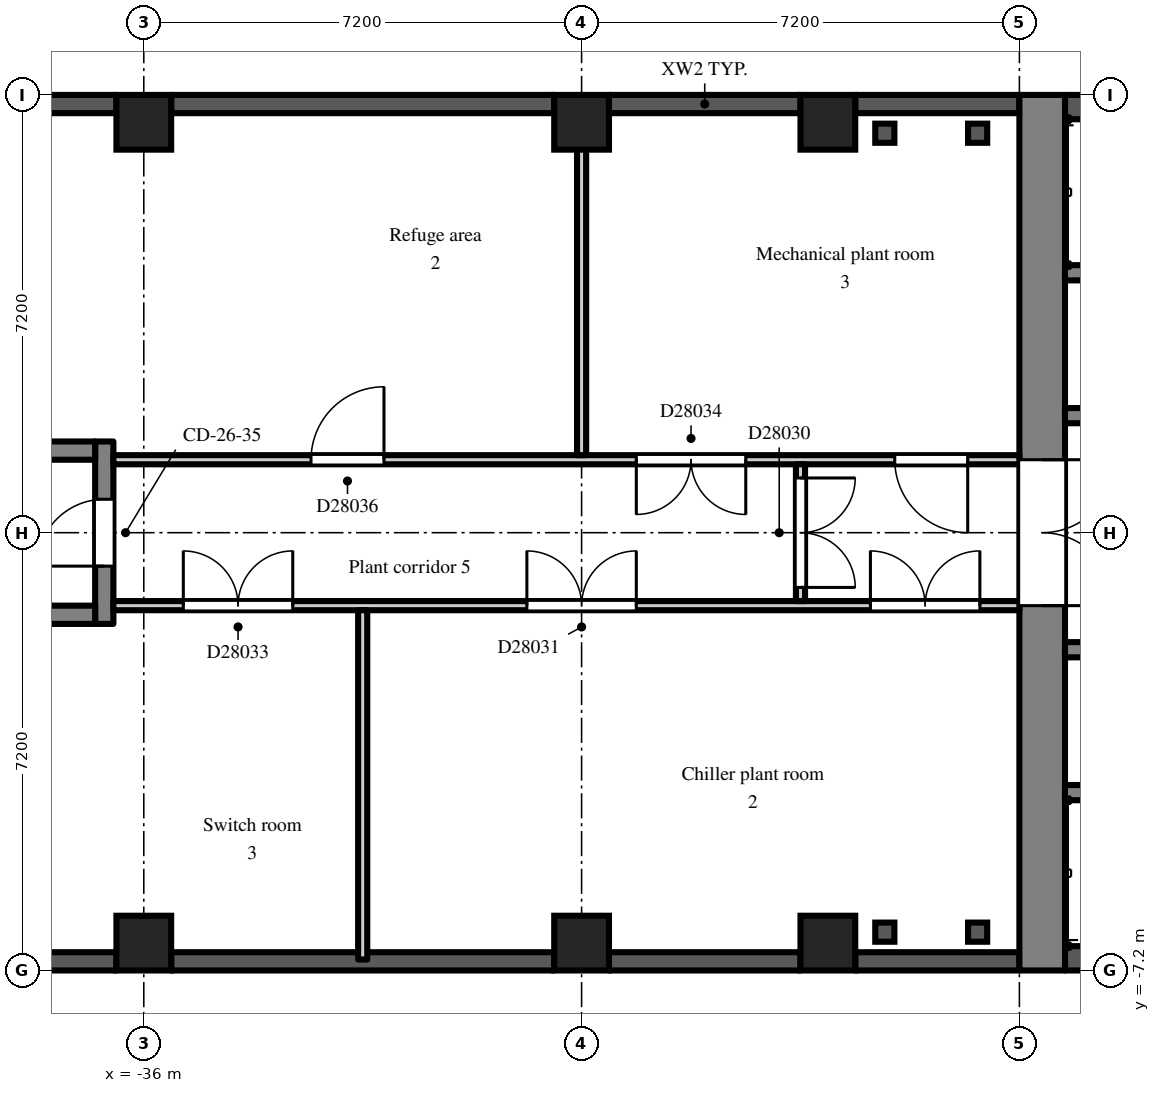
"""IFC4 building model, lengths in metres.
Left out: names, types, materials, properties, quantities, classifications, styles, units other than length and angle.
Written with IfcOpenShell. Run it as: python <this file> out.ifc"""

import sys

from ifc_helpers import new_model, si_unit, direction, frame, frame_2d, origin, origin_2d, place, context, subcontext, project, spatial, polyline, rectangle, outline, extrude, element, fill, save


model = new_model("IFC4")
c1 = context("Model", 3, precision=1e-05, world=origin(), true_north=direction((0.0, 1.0)))
c2 = subcontext(c1, "Body", "Model", "MODEL_VIEW")
j1 = project(units=[si_unit("LENGTHUNIT", "METRE"), si_unit("PLANEANGLEUNIT", "RADIAN")], contexts=[c1])
p1 = place(None, origin())
s1 = spatial("IfcSite", under=j1, at=p1, CompositionType="ELEMENT")
p2 = place(p1, origin())
s2 = spatial("IfcBuilding", under=s1, at=p2, CompositionType="ELEMENT")
p3 = place(p2, frame((0.0, 0.0, 194.7)))
s3 = spatial("IfcBuildingStorey", under=s2, at=p3, CompositionType="ELEMENT", Elevation=194.7)
for number, where, z_axis, x_axis in (
    (1, (-36.0, -6.75, 0.0), (0.0, 0.0, 1.0), (1.0, 0.0, 0.0)),
    (2, (-36.0, 6.75, 0.0), (0.0, 0.0, 1.0), (1.0, 0.0, 0.0)),
    (3, (-28.8, -6.75, 0.0), (0.0, 0.0, 1.0), (1.0, 0.0, 0.0)),
    (4, (-28.8, 6.75, 0.0), (0.0, 0.0, 1.0), (1.0, 0.0, 0.0)),
    (5, (-24.75, -6.75, 0.0), (0.0, 0.0, 1.0), (1.0, 0.0, 0.0)),
    (6, (-24.75, 6.75, 0.0), (0.0, 0.0, 1.0), (1.0, 0.0, 0.0)),
):
    element("IfcColumn", number, at=place(p3, frame(where, z_axis=z_axis, x_axis=x_axis)), inside=s3, PredefinedType="COLUMN", context=c2, shape_type="SweptSolid", body=[
        extrude(rectangle(XDim=0.9, YDim=0.9, at=origin_2d()), origin(), (0.0, 0.0, 1.0), 4.2),
    ])
p4 = place(p3, frame((-21.6, 7.05, 0.0), z_axis=(0.0, 0.0, 1.0), x_axis=(-1.0, 0.0, 0.0)))
e7 = element("IfcWall", 7, at=p4, inside=s3, PredefinedType="SOLIDWALL", context=c2, shape_type="SweptSolid", body=[
    extrude(rectangle(XDim=2.7, YDim=0.3, at=frame_2d((1.35, 0.0))), origin(), (0.0, 0.0, 1.0), 3.5),
])
p5 = place(p3, frame((-25.2, 7.05, 0.0), z_axis=(0.0, 0.0, 1.0), x_axis=(-1.0, 0.0, 0.0)))
e8 = element("IfcWall", 8, at=p5, inside=s3, PredefinedType="SOLIDWALL", context=c2, shape_type="SweptSolid", body=[
    extrude(rectangle(XDim=3.15, YDim=0.3, at=frame_2d((1.575, 0.0))), origin(), (0.0, 0.0, 1.0), 3.8),
])
p6 = place(p3, frame((-29.25, 7.05, 0.0), z_axis=(0.0, 0.0, 1.0), x_axis=(-1.0, 0.0, 0.0)))
e9 = element("IfcWall", 9, at=p6, inside=s3, PredefinedType="SOLIDWALL", context=c2, shape_type="SweptSolid", body=[
    extrude(outline(polyline([(0.0, 0.0), (6.3, 0.0), (6.3, 3.8), (1.952, 3.8), (1.95, 3.4), (1.15, 3.4), (1.148, 3.8), (0.0, 3.8), (0.0, 0.0)])), frame((0.0, 0.15, 0.0), z_axis=(0.0, -1.0, 0.0), x_axis=(1.0, 0.0, 0.0)), (0.0, 0.0, 1.0), 0.3),
])
for number, where, z_axis, x_axis in (
    (10, (-36.45, 7.05, 0.0), (0.0, 0.0, 1.0), (-1.0, 0.0, 0.0)),
    (11, (-38.7, -7.05, 0.0), (0.0, 0.0, 1.0), (1.0, 0.0, 0.0)),
):
    element("IfcWall", number, at=place(p3, frame(where, z_axis=z_axis, x_axis=x_axis)), inside=s3, PredefinedType="SOLIDWALL", context=c2, shape_type="SweptSolid", body=[
        extrude(rectangle(XDim=2.25, YDim=0.3, at=frame_2d((1.125, 0.0))), origin(), (0.0, 0.0, 1.0), 3.8),
    ])
p7 = place(p3, frame((-35.55, -7.05, 0.0), z_axis=(0.0, 0.0, 1.0), x_axis=(1.0, 0.0, 0.0)))
e12 = element("IfcWall", 12, at=p7, inside=s3, PredefinedType="SOLIDWALL", context=c2, shape_type="SweptSolid", body=[
    extrude(outline(polyline([(0.0, 0.0), (6.3, 0.0), (6.3, 3.8), (5.152, 3.8), (5.15, 3.4), (4.35, 3.4), (4.348, 3.8), (0.0, 3.8), (0.0, 0.0)])), frame((0.0, 0.15, 0.0), z_axis=(0.0, -1.0, 0.0), x_axis=(1.0, 0.0, 0.0)), (0.0, 0.0, 1.0), 0.3),
])
p8 = place(p3, frame((-28.35, -7.05, 0.0), z_axis=(0.0, 0.0, 1.0), x_axis=(1.0, 0.0, 0.0)))
e13 = element("IfcWall", 13, at=p8, inside=s3, PredefinedType="SOLIDWALL", context=c2, shape_type="SweptSolid", body=[
    extrude(rectangle(XDim=3.15, YDim=0.3, at=frame_2d((1.575, 0.0))), origin(), (0.0, 0.0, 1.0), 3.8),
])
p9 = place(p3, frame((-24.3, -7.05, 0.0), z_axis=(0.0, 0.0, 1.0), x_axis=(1.0, 0.0, 0.0)))
e14 = element("IfcWall", 14, at=p9, inside=s3, PredefinedType="SOLIDWALL", context=c2, shape_type="SweptSolid", body=[
    extrude(rectangle(XDim=2.7, YDim=0.3, at=frame_2d((1.35, 0.0))), origin(), (0.0, 0.0, 1.0), 3.5),
])
p10 = place(p3, frame((-21.225, -7.2, 0.0), z_axis=(0.0, 0.0, 1.0), x_axis=(0.0, 1.0, 0.0)))
e15 = element("IfcWall", 15, at=p10, inside=s3, PredefinedType="SHEAR", context=c2, shape_type="SweptSolid", body=[
    extrude(rectangle(XDim=14.4, YDim=0.75, at=frame_2d((7.2, 0.0))), origin(), (0.0, 0.0, 1.0), 3.8),
])
p11 = place(p10, frame((6.0, 0.0, 0.0)))
e16 = element("IfcOpeningElement", 16, at=p11, cuts=e15, PredefinedType="OPENING", context=c2, shape_type="SweptSolid", body=[
    extrude(rectangle(XDim=2.4, YDim=2.2, at=frame_2d((1.2, 1.1))), frame((0.0, 0.385, 0.0), z_axis=(0.0, -1.0, 0.0), x_axis=(1.0, 0.0, 0.0)), (0.0, 0.0, 1.0), 0.77),
])
p12 = place(p3, frame((-7.9, 7.0, 0.0), z_axis=(0.0, 0.0, 1.0), x_axis=(-1.0, 0.0, 0.0)))
e17 = element("IfcWall", 17, at=p12, inside=s3, PredefinedType="SHEAR", context=c2, shape_type="SweptSolid", body=[
    extrude(rectangle(XDim=12.95, YDim=0.4, at=frame_2d((6.475, 0.0))), origin(), (0.0, 0.0, 1.0), 3.8),
])
p13 = place(p3, frame((-7.9, 1.925, 0.0), z_axis=(0.0, 0.0, 1.0), x_axis=(-1.0, 0.0, 0.0)))
e18 = element("IfcWall", 18, at=p13, inside=s3, PredefinedType="SHEAR", context=c2, shape_type="SweptSolid", body=[
    extrude(rectangle(XDim=12.95, YDim=0.25, at=frame_2d((6.475, 0.0))), origin(), (0.0, 0.0, 1.0), 3.8),
])
p14 = place(p13, frame((4.825, 0.0, 0.0)))
e19 = element("IfcOpeningElement", 19, at=p14, cuts=e18, PredefinedType="OPENING", context=c2, shape_type="SweptSolid", body=[
    extrude(rectangle(XDim=1.1, YDim=2.1, at=frame_2d((0.55, 1.05))), frame((0.0, 0.135, 0.0), z_axis=(0.0, -1.0, 0.0), x_axis=(1.0, 0.0, 0.0)), (0.0, 0.0, 1.0), 0.27),
])
p15 = place(p13, frame((7.025, 0.0, 0.0)))
e20 = element("IfcOpeningElement", 20, at=p15, cuts=e18, PredefinedType="OPENING", context=c2, shape_type="SweptSolid", body=[
    extrude(rectangle(XDim=1.1, YDim=2.1, at=frame_2d((0.55, 1.05))), frame((0.0, 0.135, 0.0), z_axis=(0.0, -1.0, 0.0), x_axis=(1.0, 0.0, 0.0)), (0.0, 0.0, 1.0), 0.27),
])
p16 = place(p13, frame((9.225, 0.0, 0.0)))
e21 = element("IfcOpeningElement", 21, at=p16, cuts=e18, PredefinedType="OPENING", context=c2, shape_type="SweptSolid", body=[
    extrude(rectangle(XDim=1.1, YDim=2.1, at=frame_2d((0.55, 1.05))), frame((0.0, 0.135, 0.0), z_axis=(0.0, -1.0, 0.0), x_axis=(1.0, 0.0, 0.0)), (0.0, 0.0, 1.0), 0.27),
])
p17 = place(p13, frame((0.525, 0.0, 0.0)))
e22 = element("IfcOpeningElement", 22, at=p17, cuts=e18, PredefinedType="OPENING", context=c2, shape_type="SweptSolid", body=[
    extrude(rectangle(XDim=0.9, YDim=2.1, at=frame_2d((0.45, 1.05))), frame((0.0, 0.135, 0.0), z_axis=(0.0, -1.0, 0.0), x_axis=(1.0, 0.0, 0.0)), (0.0, 0.0, 1.0), 0.27),
])
p18 = place(p13, frame((2.625, 0.0, 0.0)))
e23 = element("IfcOpeningElement", 23, at=p18, cuts=e18, PredefinedType="OPENING", context=c2, shape_type="SweptSolid", body=[
    extrude(rectangle(XDim=1.1, YDim=2.1, at=frame_2d((0.55, 1.05))), frame((0.0, 0.135, 0.0), z_axis=(0.0, -1.0, 0.0), x_axis=(1.0, 0.0, 0.0)), (0.0, 0.0, 1.0), 0.27),
])
p19 = place(p13, frame((11.525, 0.0, 0.0)))
e24 = element("IfcOpeningElement", 24, at=p19, cuts=e18, PredefinedType="OPENING", context=c2, shape_type="SweptSolid", body=[
    extrude(rectangle(XDim=0.9, YDim=2.1, at=frame_2d((0.45, 1.05))), frame((0.0, 0.135, 0.0), z_axis=(0.0, -1.0, 0.0), x_axis=(1.0, 0.0, 0.0)), (0.0, 0.0, 1.0), 0.27),
])
p20 = place(p3, frame((-12.3, 4.275, 0.0), z_axis=(0.0, 0.0, 1.0), x_axis=(-1.0, 0.0, 0.0)))
e25 = element("IfcWall", 25, at=p20, inside=s3, PredefinedType="SHEAR", context=c2, shape_type="SweptSolid", body=[
    extrude(rectangle(XDim=8.55, YDim=0.25, at=frame_2d((4.275, 0.0))), origin(), (0.0, 0.0, 1.0), 3.8),
])
p21 = place(p3, frame((-7.9, -7.0, 0.0), z_axis=(0.0, 0.0, 1.0), x_axis=(-1.0, 0.0, 0.0)))
e26 = element("IfcWall", 26, at=p21, inside=s3, PredefinedType="SHEAR", context=c2, shape_type="SweptSolid", body=[
    extrude(rectangle(XDim=12.95, YDim=0.4, at=frame_2d((6.475, 0.0))), origin(), (0.0, 0.0, 1.0), 3.8),
])
p22 = place(p3, frame((-7.9, -1.925, 0.0), z_axis=(0.0, 0.0, 1.0), x_axis=(-1.0, 0.0, 0.0)))
e27 = element("IfcWall", 27, at=p22, inside=s3, PredefinedType="SHEAR", context=c2, shape_type="SweptSolid", body=[
    extrude(rectangle(XDim=12.95, YDim=0.25, at=frame_2d((6.475, 0.0))), origin(), (0.0, 0.0, 1.0), 3.8),
])
p23 = place(p22, frame((0.525, 0.0, 0.0)))
e28 = element("IfcOpeningElement", 28, at=p23, cuts=e27, PredefinedType="OPENING", context=c2, shape_type="SweptSolid", body=[
    extrude(rectangle(XDim=0.9, YDim=2.1, at=frame_2d((0.45, 1.05))), frame((0.0, 0.135, 0.0), z_axis=(0.0, -1.0, 0.0), x_axis=(1.0, 0.0, 0.0)), (0.0, 0.0, 1.0), 0.27),
])
p24 = place(p22, frame((2.625, 0.0, 0.0)))
e29 = element("IfcOpeningElement", 29, at=p24, cuts=e27, PredefinedType="OPENING", context=c2, shape_type="SweptSolid", body=[
    extrude(rectangle(XDim=1.1, YDim=2.1, at=frame_2d((0.55, 1.05))), frame((0.0, 0.135, 0.0), z_axis=(0.0, -1.0, 0.0), x_axis=(1.0, 0.0, 0.0)), (0.0, 0.0, 1.0), 0.27),
])
p25 = place(p22, frame((4.925, 0.0, 0.0)))
e30 = element("IfcOpeningElement", 30, at=p25, cuts=e27, PredefinedType="OPENING", context=c2, shape_type="SweptSolid", body=[
    extrude(rectangle(XDim=0.9, YDim=2.1, at=frame_2d((0.45, 1.05))), frame((0.0, 0.135, 0.0), z_axis=(0.0, -1.0, 0.0), x_axis=(1.0, 0.0, 0.0)), (0.0, 0.0, 1.0), 0.27),
])
p26 = place(p22, frame((8.225, 0.0, 0.0)))
e31 = element("IfcOpeningElement", 31, at=p26, cuts=e27, PredefinedType="OPENING", context=c2, shape_type="SweptSolid", body=[
    extrude(rectangle(XDim=0.9, YDim=2.1, at=frame_2d((0.45, 1.05))), frame((0.0, 0.135, 0.0), z_axis=(0.0, -1.0, 0.0), x_axis=(1.0, 0.0, 0.0)), (0.0, 0.0, 1.0), 0.27),
])
p27 = place(p22, frame((11.525, 0.0, 0.0)))
e32 = element("IfcOpeningElement", 32, at=p27, cuts=e27, PredefinedType="OPENING", context=c2, shape_type="SweptSolid", body=[
    extrude(rectangle(XDim=0.9, YDim=2.1, at=frame_2d((0.45, 1.05))), frame((0.0, 0.135, 0.0), z_axis=(0.0, -1.0, 0.0), x_axis=(1.0, 0.0, 0.0)), (0.0, 0.0, 1.0), 0.27),
])
p28 = place(p3, frame((-12.3, -4.275, 0.0), z_axis=(0.0, 0.0, 1.0), x_axis=(-1.0, 0.0, 0.0)))
e33 = element("IfcWall", 33, at=p28, inside=s3, PredefinedType="SHEAR", context=c2, shape_type="SweptSolid", body=[
    extrude(rectangle(XDim=8.55, YDim=0.25, at=frame_2d((4.275, 0.0))), origin(), (0.0, 0.0, 1.0), 3.8),
])
p29 = place(p3, frame((-36.65, -1.5, 0.0), z_axis=(0.0, 0.0, 1.0), x_axis=(0.0, 1.0, 0.0)))
e34 = element("IfcWall", 34, at=p29, inside=s3, PredefinedType="SHEAR", context=c2, shape_type="SweptSolid", body=[
    extrude(rectangle(XDim=3.0, YDim=0.3, at=frame_2d((1.5, 0.0))), origin(), (0.0, 0.0, 1.0), 3.8),
])
p30 = place(p29, frame((0.95, 0.0, 0.0)))
e35 = element("IfcOpeningElement", 35, at=p30, cuts=e34, PredefinedType="OPENING", context=c2, shape_type="SweptSolid", body=[
    extrude(rectangle(XDim=1.1, YDim=2.1, at=frame_2d((0.55, 1.05))), frame((0.0, 0.16, 0.0), z_axis=(0.0, -1.0, 0.0), x_axis=(1.0, 0.0, 0.0)), (0.0, 0.0, 1.0), 0.32),
])
for number, where, z_axis, x_axis in (
    (36, (-36.8, -1.35, 0.0), (0.0, 0.0, 1.0), (-1.0, 0.0, 0.0)),
    (37, (-36.8, 1.35, 0.0), (0.0, 0.0, 1.0), (-1.0, 0.0, 0.0)),
):
    element("IfcWall", number, at=place(p3, frame(where, z_axis=z_axis, x_axis=x_axis)), inside=s3, PredefinedType="SHEAR", context=c2, shape_type="SweptSolid", body=[
        extrude(rectangle(XDim=5.8, YDim=0.3, at=frame_2d((2.9, 0.0))), origin(), (0.0, 0.0, 1.0), 3.8),
    ])
p31 = place(p3, frame((-36.5, -1.2, 0.0), z_axis=(0.0, 0.0, 1.0), x_axis=(1.0, 0.0, 0.0)))
e38 = element("IfcWall", 38, at=p31, inside=s3, PredefinedType="PARTITIONING", context=c2, shape_type="SweptSolid", body=[
    extrude(outline(polyline([(0.0, 0.0), (14.9, 0.0), (14.9, 3.8), (6.102, 3.8), (6.1, 3.4), (5.3, 3.4), (5.298, 3.8), (0.0, 3.8), (0.0, 0.0)])), frame((0.0, 0.075, 0.0), z_axis=(0.0, -1.0, 0.0), x_axis=(1.0, 0.0, 0.0)), (0.0, 0.0, 1.0), 0.15),
])
p32 = place(p31, frame((6.8, 0.0, 0.0)))
e39 = element("IfcOpeningElement", 39, at=p32, cuts=e38, PredefinedType="OPENING", context=c2, shape_type="SweptSolid", body=[
    extrude(rectangle(XDim=1.8, YDim=2.1, at=frame_2d((0.9, 1.05))), frame((0.0, 0.085, 0.0), z_axis=(0.0, -1.0, 0.0), x_axis=(1.0, 0.0, 0.0)), (0.0, 0.0, 1.0), 0.17),
])
p33 = place(p31, frame((12.45, 0.0, 0.0)))
e40 = element("IfcOpeningElement", 40, at=p33, cuts=e38, PredefinedType="OPENING", context=c2, shape_type="SweptSolid", body=[
    extrude(rectangle(XDim=1.8, YDim=2.1, at=frame_2d((0.9, 1.05))), frame((0.0, 0.085, 0.0), z_axis=(0.0, -1.0, 0.0), x_axis=(1.0, 0.0, 0.0)), (0.0, 0.0, 1.0), 0.17),
])
p34 = place(p31, frame((1.15, 0.0, 0.0)))
e41 = element("IfcOpeningElement", 41, at=p34, cuts=e38, PredefinedType="OPENING", context=c2, shape_type="SweptSolid", body=[
    extrude(rectangle(XDim=1.8, YDim=2.1, at=frame_2d((0.9, 1.05))), frame((0.0, 0.085, 0.0), z_axis=(0.0, -1.0, 0.0), x_axis=(1.0, 0.0, 0.0)), (0.0, 0.0, 1.0), 0.17),
])
p35 = place(p3, frame((-36.5, 1.2, 0.0), z_axis=(0.0, 0.0, 1.0), x_axis=(1.0, 0.0, 0.0)))
e42 = element("IfcWall", 42, at=p35, inside=s3, PredefinedType="PARTITIONING", context=c2, shape_type="SweptSolid", body=[
    extrude(outline(polyline([(0.0, 0.0), (14.9, 0.0), (14.9, 3.8), (6.102, 3.8), (6.1, 3.4), (5.3, 3.4), (5.298, 3.8), (0.0, 3.8), (0.0, 0.0)])), frame((0.0, 0.075, 0.0), z_axis=(0.0, -1.0, 0.0), x_axis=(1.0, 0.0, 0.0)), (0.0, 0.0, 1.0), 0.15),
])
p36 = place(p35, frame((8.6, 0.0, 0.0)))
e43 = element("IfcOpeningElement", 43, at=p36, cuts=e42, PredefinedType="OPENING", context=c2, shape_type="SweptSolid", body=[
    extrude(rectangle(XDim=1.8, YDim=2.1, at=frame_2d((0.9, 1.05))), frame((0.0, 0.085, 0.0), z_axis=(0.0, -1.0, 0.0), x_axis=(1.0, 0.0, 0.0)), (0.0, 0.0, 1.0), 0.17),
])
p37 = place(p35, frame((12.85, 0.0, 0.0)))
e44 = element("IfcOpeningElement", 44, at=p37, cuts=e42, PredefinedType="OPENING", context=c2, shape_type="SweptSolid", body=[
    extrude(rectangle(XDim=1.2, YDim=2.1, at=frame_2d((0.6, 1.05))), frame((0.0, 0.085, 0.0), z_axis=(0.0, -1.0, 0.0), x_axis=(1.0, 0.0, 0.0)), (0.0, 0.0, 1.0), 0.17),
])
p38 = place(p35, frame((3.25, 0.0, 0.0)))
e45 = element("IfcOpeningElement", 45, at=p38, cuts=e42, PredefinedType="OPENING", context=c2, shape_type="SweptSolid", body=[
    extrude(rectangle(XDim=1.2, YDim=2.1, at=frame_2d((0.6, 1.05))), frame((0.0, 0.085, 0.0), z_axis=(0.0, -1.0, 0.0), x_axis=(1.0, 0.0, 0.0)), (0.0, 0.0, 1.0), 0.17),
])
p39 = place(p3, frame((-32.4, -7.02, 0.0), z_axis=(0.0, 0.0, 1.0), x_axis=(0.0, 1.0, 0.0)))
e46 = element("IfcWall", 46, at=p39, inside=s3, PredefinedType="PARTITIONING", context=c2, shape_type="SweptSolid", body=[
    extrude(rectangle(XDim=5.745, YDim=0.15, at=frame_2d((2.873, 0.0))), origin(), (0.0, 0.0, 1.0), 3.8),
])
p40 = place(p3, frame((-28.8, 1.275, 0.0), z_axis=(0.0, 0.0, 1.0), x_axis=(0.0, 1.0, 0.0)))
e47 = element("IfcWall", 47, at=p40, inside=s3, PredefinedType="PARTITIONING", context=c2, shape_type="SweptSolid", body=[
    extrude(rectangle(XDim=5.625, YDim=0.15, at=frame_2d((2.812, 0.0))), origin(), (0.0, 0.0, 1.0), 2.3),
])
p41 = place(p3, frame((-25.2, -1.125, 0.0), z_axis=(0.0, 0.0, 1.0), x_axis=(0.0, 1.0, 0.0)))
e48 = element("IfcWall", 48, at=p41, inside=s3, PredefinedType="PARTITIONING", context=c2, shape_type="SweptSolid", body=[
    extrude(rectangle(XDim=2.25, YDim=0.15, at=frame_2d((1.125, 0.0))), origin(), (0.0, 0.0, 1.0), 3.8),
])
p42 = place(p41, frame((0.225, 0.0, 0.0)))
e49 = element("IfcOpeningElement", 49, at=p42, cuts=e48, PredefinedType="OPENING", context=c2, shape_type="SweptSolid", body=[
    extrude(rectangle(XDim=1.8, YDim=2.1, at=frame_2d((0.9, 1.05))), frame((0.0, 0.085, 0.0), z_axis=(0.0, -1.0, 0.0), x_axis=(1.0, 0.0, 0.0)), (0.0, 0.0, 1.0), 0.17),
])
p43 = place(p11, frame((2.4, 0.0, 0.0), z_axis=(0.0, 0.0, 1.0), x_axis=(-1.0, 0.0, 0.0)))
e50 = element("IfcDoor", 50, at=p43, inside=s3, OperationType="DOUBLE_DOOR_DOUBLE_SWING", PredefinedType="DOOR", context=c2, shape_type="SweptSolid", body=[
    extrude(rectangle(XDim=2.4, YDim=2.2, at=frame_2d((1.2, 1.1))), frame((0.0, 0.025, 0.0), z_axis=(0.0, -1.0, 0.0), x_axis=(1.0, 0.0, 0.0)), (0.0, 0.0, 1.0), 0.05),
])
fill(e16, e50)
p44 = place(p30, origin())
e51 = element("IfcDoor", 51, at=p44, inside=s3, OperationType="SINGLE_SWING_LEFT", PredefinedType="DOOR", context=c2, shape_type="SweptSolid", body=[
    extrude(rectangle(XDim=1.1, YDim=2.1, at=frame_2d((0.55, 1.05))), frame((0.0, 0.025, 0.0), z_axis=(0.0, -1.0, 0.0), x_axis=(1.0, 0.0, 0.0)), (0.0, 0.0, 1.0), 0.05),
])
fill(e35, e51)
p45 = place(p42, frame((1.8, 0.0, 0.0), z_axis=(0.0, 0.0, 1.0), x_axis=(-1.0, 0.0, 0.0)))
e52 = element("IfcDoor", 52, at=p45, inside=s3, OperationType="DOUBLE_DOOR_DOUBLE_SWING", PredefinedType="DOOR", context=c2, shape_type="SweptSolid", body=[
    extrude(rectangle(XDim=1.8, YDim=2.1, at=frame_2d((0.9, 1.05))), frame((0.0, 0.025, 0.0), z_axis=(0.0, -1.0, 0.0), x_axis=(1.0, 0.0, 0.0)), (0.0, 0.0, 1.0), 0.05),
])
fill(e49, e52)
p46 = place(p32, origin())
e53 = element("IfcDoor", 53, at=p46, inside=s3, OperationType="DOUBLE_DOOR_DOUBLE_SWING", PredefinedType="DOOR", context=c2, shape_type="SweptSolid", body=[
    extrude(rectangle(XDim=1.8, YDim=2.1, at=frame_2d((0.9, 1.05))), frame((0.0, 0.025, 0.0), z_axis=(0.0, -1.0, 0.0), x_axis=(1.0, 0.0, 0.0)), (0.0, 0.0, 1.0), 0.05),
])
fill(e39, e53)
p47 = place(p33, origin())
e54 = element("IfcDoor", 54, at=p47, inside=s3, OperationType="DOUBLE_DOOR_DOUBLE_SWING", PredefinedType="DOOR", context=c2, shape_type="SweptSolid", body=[
    extrude(rectangle(XDim=1.8, YDim=2.1, at=frame_2d((0.9, 1.05))), frame((0.0, 0.025, 0.0), z_axis=(0.0, -1.0, 0.0), x_axis=(1.0, 0.0, 0.0)), (0.0, 0.0, 1.0), 0.05),
])
fill(e40, e54)
p48 = place(p34, origin())
e55 = element("IfcDoor", 55, at=p48, inside=s3, OperationType="DOUBLE_DOOR_DOUBLE_SWING", PredefinedType="DOOR", context=c2, shape_type="SweptSolid", body=[
    extrude(rectangle(XDim=1.8, YDim=2.1, at=frame_2d((0.9, 1.05))), frame((0.0, 0.025, 0.0), z_axis=(0.0, -1.0, 0.0), x_axis=(1.0, 0.0, 0.0)), (0.0, 0.0, 1.0), 0.05),
])
fill(e41, e55)
p49 = place(p36, frame((1.8, 0.0, 0.0), z_axis=(0.0, 0.0, 1.0), x_axis=(-1.0, 0.0, 0.0)))
e56 = element("IfcDoor", 56, at=p49, inside=s3, OperationType="DOUBLE_DOOR_DOUBLE_SWING", PredefinedType="DOOR", context=c2, shape_type="SweptSolid", body=[
    extrude(rectangle(XDim=1.8, YDim=2.1, at=frame_2d((0.9, 1.05))), frame((0.0, 0.025, 0.0), z_axis=(0.0, -1.0, 0.0), x_axis=(1.0, 0.0, 0.0)), (0.0, 0.0, 1.0), 0.05),
])
fill(e43, e56)
p50 = place(p37, frame((1.2, 0.0, 0.0), z_axis=(0.0, 0.0, 1.0), x_axis=(-1.0, 0.0, 0.0)))
e57 = element("IfcDoor", 57, at=p50, inside=s3, OperationType="SINGLE_SWING_LEFT", PredefinedType="DOOR", context=c2, shape_type="SweptSolid", body=[
    extrude(rectangle(XDim=1.2, YDim=2.1, at=frame_2d((0.6, 1.05))), frame((0.0, 0.025, 0.0), z_axis=(0.0, -1.0, 0.0), x_axis=(1.0, 0.0, 0.0)), (0.0, 0.0, 1.0), 0.05),
])
fill(e44, e57)
p51 = place(p38, origin())
e58 = element("IfcDoor", 58, at=p51, inside=s3, OperationType="SINGLE_SWING_RIGHT", PredefinedType="DOOR", context=c2, shape_type="SweptSolid", body=[
    extrude(rectangle(XDim=1.2, YDim=2.1, at=frame_2d((0.6, 1.05))), frame((0.0, 0.025, 0.0), z_axis=(0.0, -1.0, 0.0), x_axis=(1.0, 0.0, 0.0)), (0.0, 0.0, 1.0), 0.05),
])
fill(e45, e58)
save(model, sys.argv[1])
